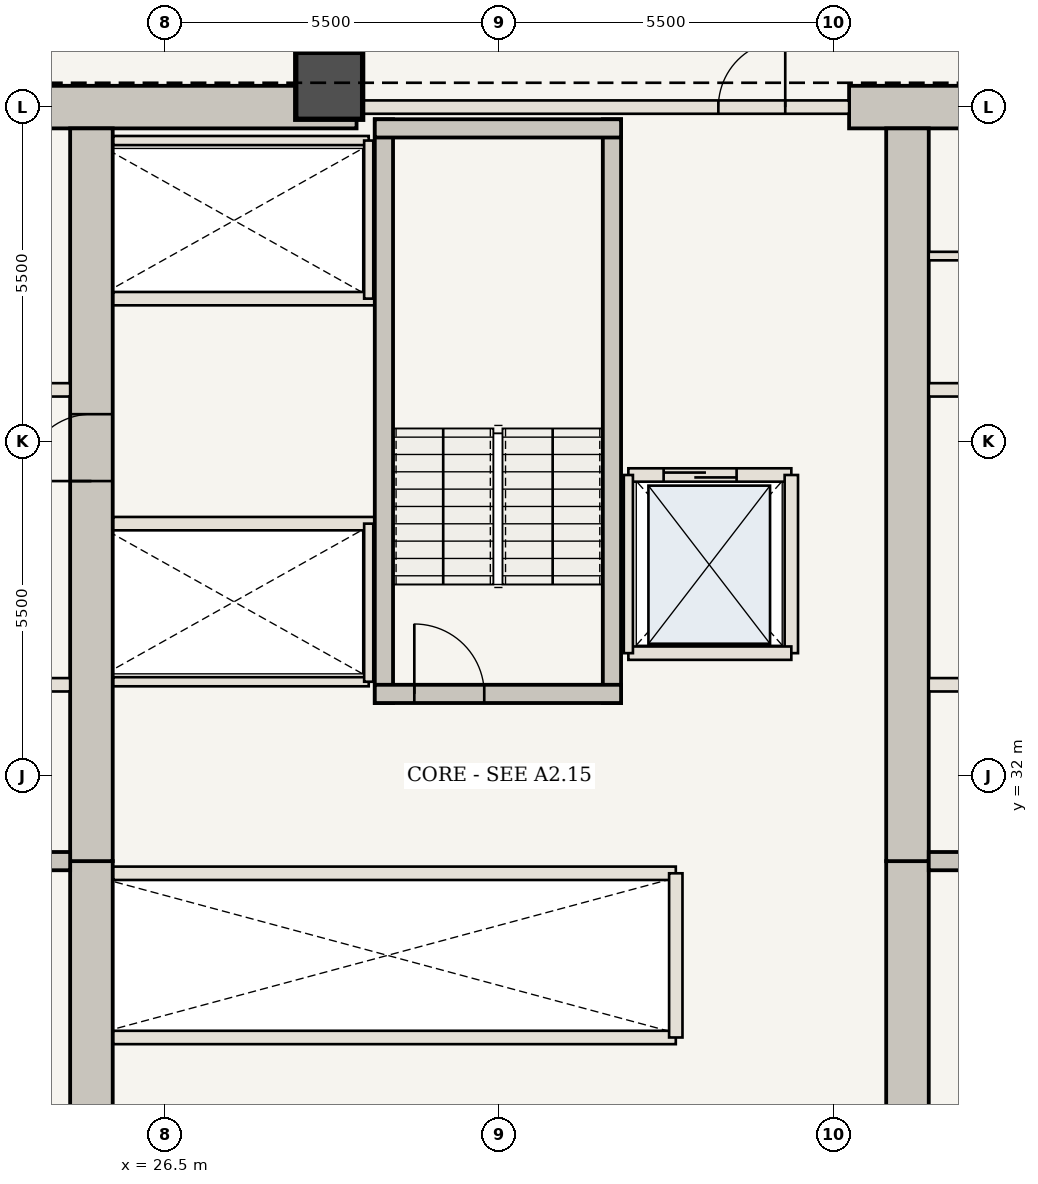
"""IFC4 building model, lengths in metres.
Left out: names, types, materials, properties, quantities, classifications, styles, units other than length and angle.
Written with IfcOpenShell. Run it as: python <this file> out.ifc"""

import sys

from ifc_helpers import new_model, si_unit, direction, frame, frame_2d, origin, origin_2d, place, context, subcontext, project, spatial, rectangle, extrude, element, fill, save


model = new_model("IFC4")
c1 = context("Model", 3, precision=1e-05, world=origin(), true_north=direction((0.0, 1.0)))
c2 = subcontext(c1, "Body", "Model", "MODEL_VIEW")
j1 = project(units=[si_unit("LENGTHUNIT", "METRE"), si_unit("PLANEANGLEUNIT", "RADIAN")], contexts=[c1])
p1 = place(None, origin())
s1 = spatial("IfcSite", under=j1, at=p1, CompositionType="ELEMENT")
p2 = place(p1, origin())
s2 = spatial("IfcBuilding", under=s1, at=p2, CompositionType="ELEMENT")
p3 = place(p2, frame((0.0, 0.0, 59.85)))
s3 = spatial("IfcBuildingStorey", under=s2, at=p3, CompositionType="ELEMENT", Elevation=59.85)
p4 = place(p3, frame((21.41, 43.0, 0.0), z_axis=(0.0, 0.0, 1.0), x_axis=(1.0, 0.0, 0.0)))
e1 = element("IfcWall", 1, at=p4, inside=s3, PredefinedType="SHEAR", context=c2, shape_type="SweptSolid", body=[
    extrude(rectangle(XDim=8.24, YDim=0.7, at=frame_2d((4.12, 0.0))), origin(), (0.0, 0.0, 1.0), 3.5),
])
p5 = place(p3, frame((37.75, 43.0, 0.0), z_axis=(0.0, 0.0, 1.0), x_axis=(1.0, 0.0, 0.0)))
e2 = element("IfcWall", 2, at=p5, inside=s3, PredefinedType="SHEAR", context=c2, shape_type="SweptSolid", body=[
    extrude(rectangle(XDim=4.84, YDim=0.7, at=frame_2d((2.42, 0.0))), origin(), (0.0, 0.0, 1.0), 3.5),
])
p6 = place(p3, frame((25.29, 21.3, 0.0), z_axis=(0.0, 0.0, 1.0), x_axis=(0.0, 1.0, 0.0)))
e3 = element("IfcWall", 3, at=p6, inside=s3, PredefinedType="SHEAR", context=c2, shape_type="SweptSolid", body=[
    extrude(rectangle(XDim=9.3, YDim=0.7, at=frame_2d((4.65, 0.0))), origin(), (0.0, 0.0, 1.0), 3.5),
])
p7 = place(p3, frame((25.29, 30.6, 0.0), z_axis=(0.0, 0.0, 1.0), x_axis=(0.0, 1.0, 0.0)))
e4 = element("IfcWall", 4, at=p7, inside=s3, PredefinedType="SHEAR", context=c2, shape_type="SweptSolid", body=[
    extrude(rectangle(XDim=12.05, YDim=0.7, at=frame_2d((6.025, 0.0))), origin(), (0.0, 0.0, 1.0), 3.5),
])
p8 = place(p7, frame((6.25, 0.0, 0.0)))
e5 = element("IfcOpeningElement", 5, at=p8, cuts=e4, PredefinedType="OPENING", context=c2, shape_type="SweptSolid", body=[
    extrude(rectangle(XDim=1.1, YDim=2.15, at=frame_2d((0.55, 1.075))), frame((0.0, 0.36, 0.0), z_axis=(0.0, -1.0, 0.0), x_axis=(1.0, 0.0, 0.0)), (0.0, 0.0, 1.0), 0.72),
])
p9 = place(p3, frame((38.71, 21.3, 0.0), z_axis=(0.0, 0.0, 1.0), x_axis=(0.0, 1.0, 0.0)))
e6 = element("IfcWall", 6, at=p9, inside=s3, PredefinedType="SHEAR", context=c2, shape_type="SweptSolid", body=[
    extrude(rectangle(XDim=9.3, YDim=0.7, at=frame_2d((4.65, 0.0))), origin(), (0.0, 0.0, 1.0), 3.5),
])
p10 = place(p3, frame((38.71, 30.6, 0.0), z_axis=(0.0, 0.0, 1.0), x_axis=(0.0, 1.0, 0.0)))
e7 = element("IfcWall", 7, at=p10, inside=s3, PredefinedType="SHEAR", context=c2, shape_type="SweptSolid", body=[
    extrude(rectangle(XDim=12.05, YDim=0.7, at=frame_2d((6.025, 0.0))), origin(), (0.0, 0.0, 1.0), 3.5),
])
p11 = place(p3, frame((29.2, 43.35, 0.0), z_axis=(0.0, 0.0, 1.0), x_axis=(1.0, 0.0, 0.0)))
e8 = element("IfcColumn", 8, at=p11, inside=s3, PredefinedType="COLUMN", context=c2, shape_type="SweptSolid", body=[
    extrude(rectangle(XDim=1.1, YDim=1.1, at=origin_2d()), origin(), (0.0, 0.0, 1.0), 3.5),
])
for number, where, z_axis, x_axis in (
    (9, (21.41, 30.6, 0.0), (0.0, 0.0, 1.0), (1.0, 0.0, 0.0)),
    (10, (39.06, 30.6, 0.0), (0.0, 0.0, 1.0), (1.0, 0.0, 0.0)),
):
    element("IfcWall", number, at=place(p3, frame(where, z_axis=z_axis, x_axis=x_axis)), inside=s3, PredefinedType="SHEAR", context=c2, shape_type="SweptSolid", body=[
        extrude(rectangle(XDim=3.53, YDim=0.3, at=frame_2d((1.765, 0.0))), origin(), (0.0, 0.0, 1.0), 3.32),
    ])
p12 = place(p3, frame((21.41, 33.5, 0.0), z_axis=(0.0, 0.0, 1.0), x_axis=(1.0, 0.0, 0.0)))
e11 = element("IfcWall", 11, at=p12, inside=s3, PredefinedType="STANDARD", context=c2, shape_type="SweptSolid", body=[
    extrude(rectangle(XDim=3.53, YDim=0.22, at=frame_2d((1.765, 0.0))), origin(), (0.0, 0.0, 1.0), 3.32),
])
p13 = place(p12, frame((0.75, 0.0, 0.0)))
e12 = element("IfcOpeningElement", 12, at=p13, cuts=e11, PredefinedType="OPENING", context=c2, shape_type="SweptSolid", body=[
    extrude(rectangle(XDim=1.2, YDim=2.2, at=frame_2d((0.6, 1.1))), frame((0.0, 0.12, 0.0), z_axis=(0.0, -1.0, 0.0), x_axis=(1.0, 0.0, 0.0)), (0.0, 0.0, 1.0), 0.24),
])
p14 = place(p3, frame((39.06, 33.5, 0.0), z_axis=(0.0, 0.0, 1.0), x_axis=(1.0, 0.0, 0.0)))
e13 = element("IfcWall", 13, at=p14, inside=s3, PredefinedType="STANDARD", context=c2, shape_type="SweptSolid", body=[
    extrude(rectangle(XDim=3.53, YDim=0.22, at=frame_2d((1.765, 0.0))), origin(), (0.0, 0.0, 1.0), 3.32),
])
p15 = place(p14, frame((1.55, 0.0, 0.0)))
e14 = element("IfcOpeningElement", 14, at=p15, cuts=e13, PredefinedType="OPENING", context=c2, shape_type="SweptSolid", body=[
    extrude(rectangle(XDim=1.2, YDim=2.2, at=frame_2d((0.6, 1.1))), frame((0.0, 0.12, 0.0), z_axis=(0.0, -1.0, 0.0), x_axis=(1.0, 0.0, 0.0)), (0.0, 0.0, 1.0), 0.24),
])
for number, where, z_axis, x_axis in (
    (15, (21.41, 38.35, 0.0), (0.0, 0.0, 1.0), (1.0, 0.0, 0.0)),
    (16, (39.06, 38.35, 0.0), (0.0, 0.0, 1.0), (1.0, 0.0, 0.0)),
):
    element("IfcWall", number, at=place(p3, frame(where, z_axis=z_axis, x_axis=x_axis)), inside=s3, PredefinedType="STANDARD", context=c2, shape_type="SweptSolid", body=[
        extrude(rectangle(XDim=3.53, YDim=0.22, at=frame_2d((1.765, 0.0))), origin(), (0.0, 0.0, 1.0), 3.32),
    ])
p16 = place(p3, frame((39.06, 40.55, 0.0), z_axis=(0.0, 0.0, 1.0), x_axis=(1.0, 0.0, 0.0)))
e17 = element("IfcWall", 17, at=p16, inside=s3, PredefinedType="STANDARD", context=c2, shape_type="SweptSolid", body=[
    extrude(rectangle(XDim=3.53, YDim=0.14, at=frame_2d((1.765, 0.0))), origin(), (0.0, 0.0, 1.0), 3.32),
])
for number, where, z_axis, x_axis in (
    (18, (25.65, 27.7, 0.0), (0.0, 0.0, 1.0), (1.0, 0.0, 0.0)),
    (19, (25.65, 30.4, 0.0), (0.0, 0.0, 1.0), (1.0, 0.0, 0.0)),
):
    element("IfcWall", number, at=place(p3, frame(where, z_axis=z_axis, x_axis=x_axis)), inside=s3, PredefinedType="STANDARD", context=c2, shape_type="SweptSolid", body=[
        extrude(rectangle(XDim=9.25, YDim=0.22, at=frame_2d((4.625, 0.0))), origin(), (0.0, 0.0, 1.0), 3.32),
    ])
p17 = place(p3, frame((34.9, 27.7, 0.0), z_axis=(0.0, 0.0, 1.0), x_axis=(0.0, 1.0, 0.0)))
e20 = element("IfcWall", 20, at=p17, inside=s3, PredefinedType="STANDARD", context=c2, shape_type="SweptSolid", body=[
    extrude(rectangle(XDim=2.7, YDim=0.22, at=frame_2d((1.35, 0.0))), origin(), (0.0, 0.0, 1.0), 3.32),
])
p18 = place(p3, frame((25.65, 36.15, 0.0), z_axis=(0.0, 0.0, 1.0), x_axis=(1.0, 0.0, 0.0)))
e21 = element("IfcWall", 21, at=p18, inside=s3, PredefinedType="STANDARD", context=c2, shape_type="SweptSolid", body=[
    extrude(rectangle(XDim=4.3, YDim=0.22, at=frame_2d((2.15, 0.0))), origin(), (0.0, 0.0, 1.0), 3.32),
])
p19 = place(p3, frame((25.65, 33.55, 0.0), z_axis=(0.0, 0.0, 1.0), x_axis=(1.0, 0.0, 0.0)))
e22 = element("IfcWall", 22, at=p19, inside=s3, PredefinedType="STANDARD", context=c2, shape_type="SweptSolid", body=[
    extrude(rectangle(XDim=4.2, YDim=0.15, at=frame_2d((2.1, 0.0))), origin(), (0.0, 0.0, 1.0), 3.32),
])
p20 = place(p3, frame((29.85, 33.55, 0.0), z_axis=(0.0, 0.0, 1.0), x_axis=(0.0, 1.0, 0.0)))
e23 = element("IfcWall", 23, at=p20, inside=s3, PredefinedType="STANDARD", context=c2, shape_type="SweptSolid", body=[
    extrude(rectangle(XDim=2.6, YDim=0.15, at=frame_2d((1.3, 0.0))), origin(), (0.0, 0.0, 1.0), 3.32),
])
p21 = place(p3, frame((25.65, 39.85, 0.0), z_axis=(0.0, 0.0, 1.0), x_axis=(1.0, 0.0, 0.0)))
e24 = element("IfcWall", 24, at=p21, inside=s3, PredefinedType="STANDARD", context=c2, shape_type="SweptSolid", body=[
    extrude(rectangle(XDim=4.3, YDim=0.22, at=frame_2d((2.15, 0.0))), origin(), (0.0, 0.0, 1.0), 3.32),
])
p22 = place(p3, frame((25.65, 42.45, 0.0), z_axis=(0.0, 0.0, 1.0), x_axis=(1.0, 0.0, 0.0)))
e25 = element("IfcWall", 25, at=p22, inside=s3, PredefinedType="STANDARD", context=c2, shape_type="SweptSolid", body=[
    extrude(rectangle(XDim=4.2, YDim=0.15, at=frame_2d((2.1, 0.0))), origin(), (0.0, 0.0, 1.0), 3.32),
])
p23 = place(p3, frame((29.85, 39.85, 0.0), z_axis=(0.0, 0.0, 1.0), x_axis=(0.0, 1.0, 0.0)))
e26 = element("IfcWall", 26, at=p23, inside=s3, PredefinedType="STANDARD", context=c2, shape_type="SweptSolid", body=[
    extrude(rectangle(XDim=2.6, YDim=0.15, at=frame_2d((1.3, 0.0))), origin(), (0.0, 0.0, 1.0), 3.32),
])
for number, where, z_axis, x_axis in (
    (27, (30.1, 33.2, 0.0), (0.0, 0.0, 1.0), (0.0, 1.0, 0.0)),
    (28, (33.85, 33.2, 0.0), (0.0, 0.0, 1.0), (0.0, 1.0, 0.0)),
):
    element("IfcWall", number, at=place(p3, frame(where, z_axis=z_axis, x_axis=x_axis)), inside=s3, PredefinedType="SHEAR", context=c2, shape_type="SweptSolid", body=[
        extrude(rectangle(XDim=9.6, YDim=0.3, at=frame_2d((4.8, 0.0))), origin(), (0.0, 0.0, 1.0), 3.32),
    ])
p24 = place(p3, frame((29.95, 33.35, 0.0), z_axis=(0.0, 0.0, 1.0), x_axis=(1.0, 0.0, 0.0)))
e29 = element("IfcWall", 29, at=p24, inside=s3, PredefinedType="SHEAR", context=c2, shape_type="SweptSolid", body=[
    extrude(rectangle(XDim=4.05, YDim=0.3, at=frame_2d((2.025, 0.0))), origin(), (0.0, 0.0, 1.0), 3.32),
])
p25 = place(p24, frame((0.65, 0.0, 0.0)))
e30 = element("IfcOpeningElement", 30, at=p25, cuts=e29, PredefinedType="OPENING", context=c2, shape_type="SweptSolid", body=[
    extrude(rectangle(XDim=1.15, YDim=2.15, at=frame_2d((0.575, 1.075))), frame((0.0, 0.16, 0.0), z_axis=(0.0, -1.0, 0.0), x_axis=(1.0, 0.0, 0.0)), (0.0, 0.0, 1.0), 0.32),
])
p26 = place(p3, frame((29.95, 42.65, 0.0), z_axis=(0.0, 0.0, 1.0), x_axis=(1.0, 0.0, 0.0)))
e31 = element("IfcWall", 31, at=p26, inside=s3, PredefinedType="SHEAR", context=c2, shape_type="SweptSolid", body=[
    extrude(rectangle(XDim=4.05, YDim=0.3, at=frame_2d((2.025, 0.0))), origin(), (0.0, 0.0, 1.0), 3.32),
])
p27 = place(p3, frame((29.65, 43.0, 0.0), z_axis=(0.0, 0.0, 1.0), x_axis=(1.0, 0.0, 0.0)))
e32 = element("IfcWall", 32, at=p27, inside=s3, PredefinedType="STANDARD", context=c2, shape_type="SweptSolid", body=[
    extrude(rectangle(XDim=8.1, YDim=0.22, at=frame_2d((4.05, 0.0))), origin(), (0.0, 0.0, 1.0), 3.32),
])
p28 = place(p27, frame((5.95, 0.0, 0.0)))
e33 = element("IfcOpeningElement", 33, at=p28, cuts=e32, PredefinedType="OPENING", context=c2, shape_type="SweptSolid", body=[
    extrude(rectangle(XDim=1.1, YDim=2.15, at=frame_2d((0.55, 1.075))), frame((0.0, 0.12, 0.0), z_axis=(0.0, -1.0, 0.0), x_axis=(1.0, 0.0, 0.0)), (0.0, 0.0, 1.0), 0.24),
])
p29 = place(p3, frame((34.12, 36.95, 0.0), z_axis=(0.0, 0.0, 1.0), x_axis=(1.0, 0.0, 0.0)))
e34 = element("IfcWall", 34, at=p29, inside=s3, PredefinedType="STANDARD", context=c2, shape_type="SweptSolid", body=[
    extrude(rectangle(XDim=2.68, YDim=0.22, at=frame_2d((1.34, 0.0))), origin(), (0.0, 0.0, 1.0), 3.32),
])
p30 = place(p29, frame((0.58, 0.0, 0.0)))
e35 = element("IfcOpeningElement", 35, at=p30, cuts=e34, PredefinedType="OPENING", context=c2, shape_type="SweptSolid", body=[
    extrude(rectangle(XDim=1.2, YDim=2.2, at=frame_2d((0.6, 1.1))), frame((0.0, 0.12, 0.0), z_axis=(0.0, -1.0, 0.0), x_axis=(1.0, 0.0, 0.0)), (0.0, 0.0, 1.0), 0.24),
])
p31 = place(p3, frame((36.8, 34.02, 0.0), z_axis=(0.0, 0.0, 1.0), x_axis=(0.0, 1.0, 0.0)))
e36 = element("IfcWall", 36, at=p31, inside=s3, PredefinedType="STANDARD", context=c2, shape_type="SweptSolid", body=[
    extrude(rectangle(XDim=2.93, YDim=0.22, at=frame_2d((1.465, 0.0))), origin(), (0.0, 0.0, 1.0), 3.32),
])
p32 = place(p3, frame((34.12, 34.02, 0.0), z_axis=(0.0, 0.0, 1.0), x_axis=(1.0, 0.0, 0.0)))
e37 = element("IfcWall", 37, at=p32, inside=s3, PredefinedType="STANDARD", context=c2, shape_type="SweptSolid", body=[
    extrude(rectangle(XDim=2.68, YDim=0.22, at=frame_2d((1.34, 0.0))), origin(), (0.0, 0.0, 1.0), 3.32),
])
p33 = place(p3, frame((34.12, 34.02, 0.0), z_axis=(0.0, 0.0, 1.0), x_axis=(0.0, 1.0, 0.0)))
e38 = element("IfcWall", 38, at=p33, inside=s3, PredefinedType="STANDARD", context=c2, shape_type="SweptSolid", body=[
    extrude(rectangle(XDim=2.93, YDim=0.15, at=frame_2d((1.465, 0.0))), origin(), (0.0, 0.0, 1.0), 3.32),
])
p34 = place(p8, origin())
e39 = element("IfcDoor", 39, at=p34, inside=s3, OperationType="SINGLE_SWING_LEFT", PredefinedType="DOOR", context=c2, shape_type="SweptSolid", body=[
    extrude(rectangle(XDim=1.1, YDim=2.15, at=frame_2d((0.55, 1.075))), frame((0.0, 0.025, 0.0), z_axis=(0.0, -1.0, 0.0), x_axis=(1.0, 0.0, 0.0)), (0.0, 0.0, 1.0), 0.05),
])
fill(e5, e39)
p35 = place(p25, origin())
e40 = element("IfcDoor", 40, at=p35, inside=s3, OperationType="SINGLE_SWING_LEFT", PredefinedType="DOOR", context=c2, shape_type="SweptSolid", body=[
    extrude(rectangle(XDim=1.15, YDim=2.15, at=frame_2d((0.575, 1.075))), frame((0.0, 0.025, 0.0), z_axis=(0.0, -1.0, 0.0), x_axis=(1.0, 0.0, 0.0)), (0.0, 0.0, 1.0), 0.05),
])
fill(e30, e40)
p36 = place(p28, origin())
e41 = element("IfcDoor", 41, at=p36, inside=s3, OperationType="SINGLE_SWING_RIGHT", PredefinedType="DOOR", context=c2, shape_type="SweptSolid", body=[
    extrude(rectangle(XDim=1.1, YDim=2.15, at=frame_2d((0.55, 1.075))), frame((0.0, 0.025, 0.0), z_axis=(0.0, -1.0, 0.0), x_axis=(1.0, 0.0, 0.0)), (0.0, 0.0, 1.0), 0.05),
])
fill(e33, e41)
p37 = place(p30, origin())
e42 = element("IfcDoor", 42, at=p37, inside=s3, OperationType="DOUBLE_DOOR_SLIDING", PredefinedType="DOOR", context=c2, shape_type="SweptSolid", body=[
    extrude(rectangle(XDim=1.2, YDim=2.2, at=frame_2d((0.6, 1.1))), frame((0.0, 0.025, 0.0), z_axis=(0.0, -1.0, 0.0), x_axis=(1.0, 0.0, 0.0)), (0.0, 0.0, 1.0), 0.05),
])
fill(e35, e42)
save(model, sys.argv[1])
